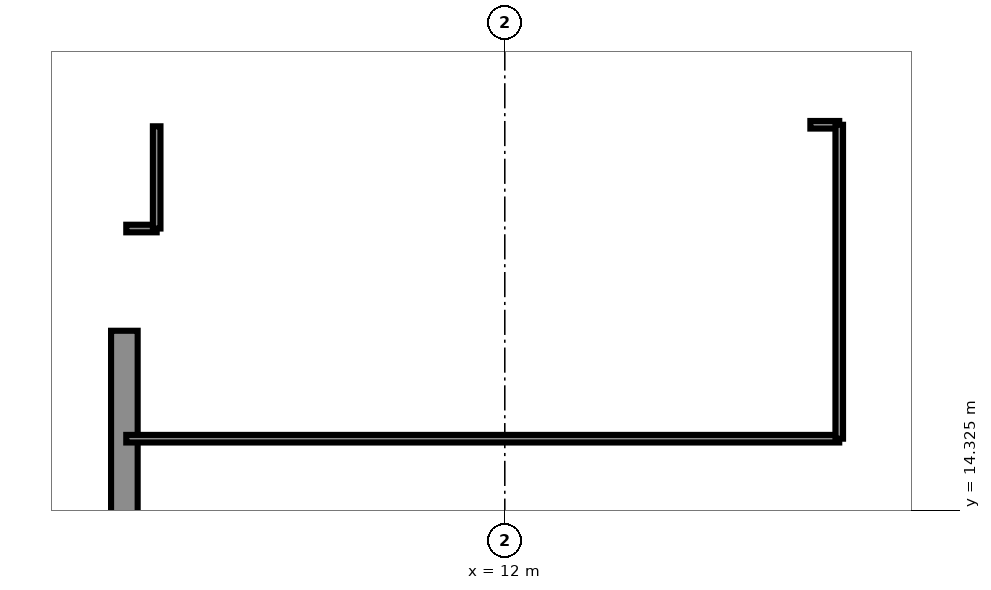
"""IFC4 building model, lengths in metres.
Left out: names, types, materials, properties, quantities, classifications, styles, units other than length and angle.
Written with IfcOpenShell. Run it as: python <this file> out.ifc"""

import sys

from ifc_helpers import new_model, si_unit, direction, frame, frame_2d, origin, origin_2d, place, context, subcontext, project, spatial, rectangle, i_section, extrude, element, fill, save


model = new_model("IFC4")
c1 = context("Model", 3, precision=1e-05, world=origin(), true_north=direction((0.0, 1.0)))
c2 = subcontext(c1, "Body", "Model", "MODEL_VIEW")
j1 = project(units=[si_unit("LENGTHUNIT", "METRE"), si_unit("PLANEANGLEUNIT", "RADIAN")], contexts=[c1])
p1 = place(None, origin())
s1 = spatial("IfcSite", under=j1, at=p1, CompositionType="ELEMENT")
p2 = place(p1, origin())
s2 = spatial("IfcBuilding", under=s1, at=p2, CompositionType="ELEMENT")
p3 = place(p2, frame((0.0, 0.0, 151.9)))
s3 = spatial("IfcBuildingStorey", under=s2, at=p3, CompositionType="ELEMENT", Elevation=151.9)
p4 = place(p3, frame((7.45, 18.533, 0.0), z_axis=(0.0, 0.0, 1.0), x_axis=(-1.0, 0.0, 0.0)))
e1 = element("IfcColumn", 1, at=p4, inside=s3, PredefinedType="COLUMN", context=c2, shape_type="SweptSolid", body=[
    extrude(i_section(OverallWidth=0.305, OverallDepth=0.62, WebThickness=0.021, FlangeThickness=0.04, FilletRadius=0.027, at=origin_2d()), origin(), (0.0, 0.0, 1.0), 3.6),
])
p5 = place(p3, frame((6.995, 16.69, 0.0), z_axis=(0.0, 0.0, 1.0), x_axis=(0.0, -1.0, 0.0)))
e2 = element("IfcWall", 2, at=p5, inside=s3, PredefinedType="SOLIDWALL", context=c2, shape_type="SweptSolid", body=[
    extrude(rectangle(XDim=6.29, YDim=0.35, at=frame_2d((3.145, 0.0))), origin(), (0.0, 0.0, 1.0), 1.0),
])
p6 = place(p3, frame((7.02, 15.27, 0.0), z_axis=(0.0, 0.0, 1.0), x_axis=(1.0, 0.0, 0.0)))
e3 = element("IfcWall", 3, at=p6, inside=s3, PredefinedType="PARTITIONING", context=c2, shape_type="SweptSolid", body=[
    extrude(rectangle(XDim=9.38, YDim=0.1, at=frame_2d((4.69, 0.0))), origin(), (0.0, 0.0, 1.0), 3.2),
])
p7 = place(p6, frame((6.29, 0.0, 0.0)))
e4 = element("IfcOpeningElement", 4, at=p7, cuts=e3, PredefinedType="OPENING", context=c2, shape_type="SweptSolid", body=[
    extrude(rectangle(XDim=1.0, YDim=2.1, at=frame_2d((0.5, 1.05))), frame((0.0, 0.06, 0.0), z_axis=(0.0, -1.0, 0.0), x_axis=(1.0, 0.0, 0.0)), (0.0, 0.0, 1.0), 0.12),
])
p8 = place(p3, frame((7.02, 18.035, 0.0), z_axis=(0.0, 0.0, 1.0), x_axis=(1.0, 0.0, 0.0)))
e5 = element("IfcWall", 5, at=p8, inside=s3, PredefinedType="PARTITIONING", context=c2, shape_type="SweptSolid", body=[
    extrude(rectangle(XDim=0.4, YDim=0.1, at=frame_2d((0.2, 0.0))), origin(), (0.0, 0.0, 1.0), 3.2),
])
p9 = place(p3, frame((7.42, 18.035, 0.0), z_axis=(0.0, 0.0, 1.0), x_axis=(0.0, 1.0, 0.0)))
e6 = element("IfcWall", 6, at=p9, inside=s3, PredefinedType="PARTITIONING", context=c2, shape_type="SweptSolid", body=[
    extrude(rectangle(XDim=1.345, YDim=0.1, at=frame_2d((0.672, 0.0))), origin(), (0.0, 0.0, 1.0), 2.58),
])
p10 = place(p3, frame((16.02, 19.4, 0.0), z_axis=(0.0, 0.0, 1.0), x_axis=(1.0, 0.0, 0.0)))
e7 = element("IfcWall", 7, at=p10, inside=s3, PredefinedType="PARTITIONING", context=c2, shape_type="SweptSolid", body=[
    extrude(rectangle(XDim=0.38, YDim=0.1, at=frame_2d((0.19, 0.0))), origin(), (0.0, 0.0, 1.0), 3.2),
])
p11 = place(p3, frame((16.4, 15.27, 0.0), z_axis=(0.0, 0.0, 1.0), x_axis=(0.0, 1.0, 0.0)))
e8 = element("IfcWall", 8, at=p11, inside=s3, PredefinedType="PARTITIONING", context=c2, shape_type="SweptSolid", body=[
    extrude(rectangle(XDim=4.13, YDim=0.1, at=frame_2d((2.065, 0.0))), origin(), (0.0, 0.0, 1.0), 3.2),
])
p12 = place(p7, origin())
e9 = element("IfcDoor", 9, at=p12, inside=s3, OperationType="SINGLE_SWING_RIGHT", PredefinedType="DOOR", context=c2, shape_type="SweptSolid", body=[
    extrude(rectangle(XDim=1.0, YDim=2.1, at=frame_2d((0.5, 1.05))), frame((0.0, 0.025, 0.0), z_axis=(0.0, -1.0, 0.0), x_axis=(1.0, 0.0, 0.0)), (0.0, 0.0, 1.0), 0.05),
])
fill(e4, e9)
save(model, sys.argv[1])
